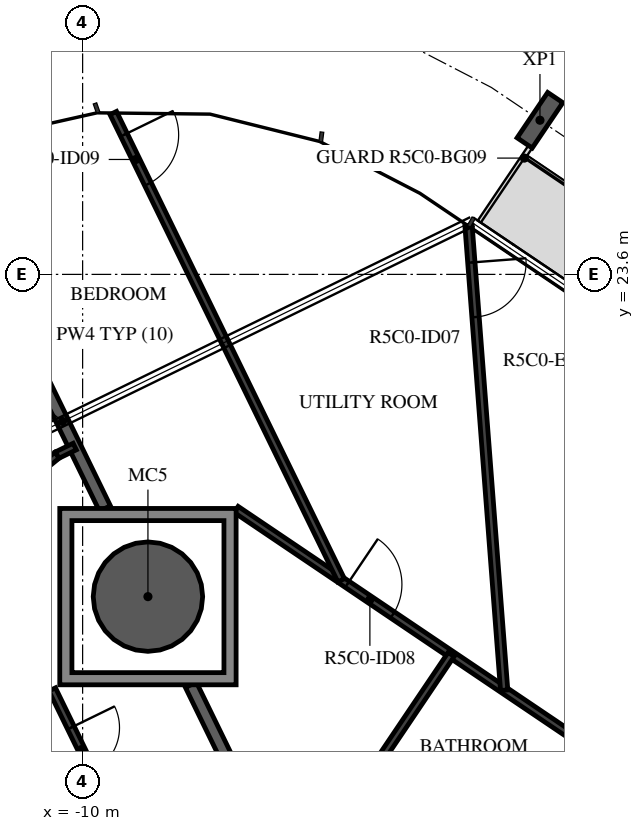
"""IFC4 building model, lengths in metres.
Left out: names, types, materials, properties, quantities, classifications, styles, units other than length and angle.
Written with IfcOpenShell. Run it as: python <this file> out.ifc"""

import sys

from ifc_helpers import new_model, si_unit, direction, frame, frame_2d, origin, origin_2d, place, context, subcontext, project, spatial, polyline, rectangle, hollow_circle, i_section, outline, extrude, element, fill, save


model = new_model("IFC4")
c1 = context("Model", 3, precision=1e-05, world=origin(), true_north=direction((0.0, 1.0)))
c2 = subcontext(c1, "Body", "Model", "MODEL_VIEW")
j1 = project(units=[si_unit("LENGTHUNIT", "METRE"), si_unit("PLANEANGLEUNIT", "RADIAN")], contexts=[c1])
p1 = place(None, origin())
s1 = spatial("IfcSite", under=j1, at=p1, CompositionType="ELEMENT")
p2 = place(p1, origin())
s2 = spatial("IfcBuilding", under=s1, at=p2, CompositionType="ELEMENT")
p3 = place(p2, frame((0.0, 0.0, 216.4)))
s3 = spatial("IfcBuildingStorey", under=s2, at=p3, CompositionType="ELEMENT", Elevation=216.4)
p4 = place(p3, frame((-8.926, 18.301, -0.38), z_axis=(0.0, 0.0, 1.0), x_axis=(1.0, 0.0, 0.0)))
e1 = element("IfcColumn", 1, at=p4, inside=s3, PredefinedType="COLUMN", context=c2, shape_type="SweptSolid", body=[
    extrude(hollow_circle(Radius=0.9, WallThickness=0.04, at=origin_2d()), origin(), (0.0, 0.0, 1.0), 2.616),
])
p5 = place(p3, frame((-2.479, 26.135, -0.38), z_axis=(0.0, 0.0, 1.0), x_axis=(0.829037661466, -0.559192771654, 0.0)))
e2 = element("IfcColumn", 2, at=p5, inside=s3, PredefinedType="COLUMN", context=c2, shape_type="SweptSolid", body=[
    extrude(i_section(OverallWidth=0.3, OverallDepth=0.9, WebThickness=0.019, FlangeThickness=0.035, FilletRadius=0.03, at=origin_2d()), origin(), (0.0, 0.0, 1.0), 2.616),
])
p6 = place(p3, frame((-8.219, 16.851, 0.0), z_axis=(0.0, 0.0, 1.0), x_axis=(0.438291091101, -0.898833087654, 0.0)))
e3 = element("IfcWall", 3, at=p6, inside=s3, PredefinedType="STANDARD", context=c2, shape_type="SweptSolid", body=[
    extrude(rectangle(XDim=3.774, YDim=0.2, at=frame_2d((1.887, 0.0))), origin(), (0.0, 0.0, 1.0), 3.05),
])
p7 = place(p3, frame((-12.409, 25.442, 0.0), z_axis=(0.0, 0.0, 1.0), x_axis=(0.43838641251, -0.898786600549, 0.0)))
e4 = element("IfcWall", 4, at=p7, inside=s3, PredefinedType="STANDARD", context=c2, shape_type="SweptSolid", body=[
    extrude(rectangle(XDim=6.333, YDim=0.2, at=frame_2d((3.166, 0.0))), origin(), (0.0, 0.0, 1.0), 3.05),
])
p8 = place(p3, frame((-7.476, 19.735, 0.0), z_axis=(0.0, 0.0, 1.0), x_axis=(0.829035412992, -0.559196105142, 0.0)))
e5 = element("IfcWall", 5, at=p8, inside=s3, PredefinedType="PARTITIONING", context=c2, shape_type="SweptSolid", body=[
    extrude(rectangle(XDim=8.531, YDim=0.12, at=frame_2d((4.266, 0.0))), origin(), (0.0, 0.0, 1.0), 3.05),
])
p9 = place(p8, frame((2.204, 0.0, 0.0)))
e6 = element("IfcOpeningElement", 6, at=p9, cuts=e5, PredefinedType="OPENING", context=c2, shape_type="SweptSolid", body=[
    extrude(rectangle(XDim=0.9, YDim=2.1, at=frame_2d((0.45, 1.05))), frame((0.0, 0.07, 0.0), z_axis=(0.0, -1.0, 0.0), x_axis=(1.0, 0.0, 0.0)), (0.0, 0.0, 1.0), 0.14),
])
p10 = place(p3, frame((-3.653, 24.394, 0.0), z_axis=(0.0, 0.0, 1.0), x_axis=(0.076513576433, -0.997068539581, 0.0)))
e7 = element("IfcWall", 7, at=p10, inside=s3, PredefinedType="PARTITIONING", context=c2, shape_type="SweptSolid", body=[
    extrude(rectangle(XDim=7.655, YDim=0.12, at=frame_2d((3.827, 0.0))), origin(), (0.0, 0.0, 1.0), 3.05),
])
p11 = place(p10, frame((0.6, 0.0, 0.0)))
e8 = element("IfcOpeningElement", 8, at=p11, cuts=e7, PredefinedType="OPENING", context=c2, shape_type="SweptSolid", body=[
    extrude(rectangle(XDim=0.9, YDim=2.1, at=frame_2d((0.45, 1.05))), frame((0.0, 0.07, 0.0), z_axis=(0.0, -1.0, 0.0), x_axis=(1.0, 0.0, 0.0)), (0.0, 0.0, 1.0), 0.14),
])
p12 = place(p3, frame((-3.939, 17.35, 0.0), z_axis=(0.0, 0.0, 1.0), x_axis=(-0.559193216274, -0.829037361566, 0.0)))
e9 = element("IfcWall", 9, at=p12, inside=s3, PredefinedType="PARTITIONING", context=c2, shape_type="SweptSolid", body=[
    extrude(rectangle(XDim=4.694, YDim=0.12, at=frame_2d((2.347, 0.0))), origin(), (0.0, 0.0, 1.0), 3.05),
])
p13 = place(p3, frame((-9.496, 26.254, 0.0), z_axis=(0.0, 0.0, 1.0), x_axis=(0.438361739807, -0.89879863433, 0.0)))
e10 = element("IfcWall", 10, at=p13, inside=s3, PredefinedType="PARTITIONING", context=c2, shape_type="SweptSolid", body=[
    extrude(rectangle(XDim=8.549, YDim=0.12, at=frame_2d((4.274, 0.0))), origin(), (0.0, 0.0, 1.0), 3.05),
])
p14 = place(p13, frame((0.4, 0.0, 0.0)))
e11 = element("IfcOpeningElement", 11, at=p14, cuts=e10, PredefinedType="OPENING", context=c2, shape_type="SweptSolid", body=[
    extrude(rectangle(XDim=0.9, YDim=2.1, at=frame_2d((0.45, 1.05))), frame((0.0, 0.07, 0.0), z_axis=(0.0, -1.0, 0.0), x_axis=(1.0, 0.0, 0.0)), (0.0, 0.0, 1.0), 0.14),
])
p15 = place(p3, frame((-10.5, 16.775, 0.0), z_axis=(0.0, 0.0, 1.0), x_axis=(0.438345136783, -0.898806731761, 0.0)))
e12 = element("IfcWall", 12, at=p15, inside=s3, PredefinedType="PARTITIONING", context=c2, shape_type="SweptSolid", body=[
    extrude(rectangle(XDim=4.78, YDim=0.12, at=frame_2d((2.39, 0.0))), origin(), (0.0, 0.0, 1.0), 3.05),
])
p16 = place(p15, frame((0.7, 0.0, 0.0)))
e13 = element("IfcOpeningElement", 13, at=p16, cuts=e12, PredefinedType="OPENING", context=c2, shape_type="SweptSolid", body=[
    extrude(rectangle(XDim=0.8, YDim=2.1, at=frame_2d((0.4, 1.05))), frame((0.0, 0.07, 0.0), z_axis=(0.0, -1.0, 0.0), x_axis=(1.0, 0.0, 0.0)), (0.0, 0.0, 1.0), 0.14),
])
p17 = place(p15, frame((2.899, 0.0, 0.0)))
e14 = element("IfcOpeningElement", 14, at=p17, cuts=e12, PredefinedType="OPENING", context=c2, shape_type="SweptSolid", body=[
    extrude(rectangle(XDim=0.9, YDim=2.1, at=frame_2d((0.45, 1.05))), frame((0.0, 0.07, 0.0), z_axis=(0.0, -1.0, 0.0), x_axis=(1.0, 0.0, 0.0)), (0.0, 0.0, 1.0), 0.14),
])
p18 = place(p3, frame((-10.915, 20.221, 0.0), z_axis=(0.0, 0.0, 1.0), x_axis=(0.773278980213, 0.634065941965, 0.0)))
e15 = element("IfcWall", 15, at=p18, inside=s3, PredefinedType="PARTITIONING", context=c2, shape_type="SweptSolid", body=[
    extrude(rectangle(XDim=0.642, YDim=0.12, at=frame_2d((0.321, 0.0))), origin(), (0.0, 0.0, 1.0), 3.05),
])
p19 = place(p3, frame((-10.418, 20.628, 0.0), z_axis=(0.0, 0.0, 1.0), x_axis=(0.898943795765, 0.438063981692, 0.0)))
e16 = element("IfcWall", 16, at=p19, inside=s3, PredefinedType="PARTITIONING", context=c2, shape_type="SweptSolid", body=[
    extrude(rectangle(XDim=0.321, YDim=0.12, at=frame_2d((0.161, 0.0))), origin(), (0.0, 0.0, 1.0), 3.05),
])
p20 = place(p3, origin())
e17 = element("IfcWall", 17, at=p20, inside=s3, PredefinedType="STANDARD", context=c2, shape_type="SweptSolid", body=[
    extrude(outline(polyline([(-7.476, 19.751), (-7.476, 16.851), (-10.376, 16.851), (-10.376, 19.751), (-7.476, 19.751)]), holes=[polyline([(-10.176, 17.051), (-7.676, 17.051), (-7.676, 19.551), (-10.176, 19.551), (-10.176, 17.051)])]), origin(), (0.0, 0.0, 1.0), 3.05),
])
p21 = place(p11, origin())
e18 = element("IfcDoor", 18, at=p21, inside=s3, OperationType="SINGLE_SWING_RIGHT", PredefinedType="DOOR", context=c2, shape_type="SweptSolid", body=[
    extrude(rectangle(XDim=0.9, YDim=2.1, at=frame_2d((0.45, 1.05))), frame((0.0, 0.025, 0.0), z_axis=(0.0, -1.0, 0.0), x_axis=(1.0, 0.0, 0.0)), (0.0, 0.0, 1.0), 0.05),
])
fill(e8, e18)
p22 = place(p9, origin())
e19 = element("IfcDoor", 19, at=p22, inside=s3, OperationType="SINGLE_SWING_LEFT", PredefinedType="DOOR", context=c2, shape_type="SweptSolid", body=[
    extrude(rectangle(XDim=0.9, YDim=2.1, at=frame_2d((0.45, 1.05))), frame((0.0, 0.025, 0.0), z_axis=(0.0, -1.0, 0.0), x_axis=(1.0, 0.0, 0.0)), (0.0, 0.0, 1.0), 0.05),
])
fill(e6, e19)
p23 = place(p14, origin())
e20 = element("IfcDoor", 20, at=p23, inside=s3, OperationType="SINGLE_SWING_RIGHT", PredefinedType="DOOR", context=c2, shape_type="SweptSolid", body=[
    extrude(rectangle(XDim=0.9, YDim=2.1, at=frame_2d((0.45, 1.05))), frame((0.0, 0.025, 0.0), z_axis=(0.0, -1.0, 0.0), x_axis=(1.0, 0.0, 0.0)), (0.0, 0.0, 1.0), 0.05),
])
fill(e11, e20)
p24 = place(p16, origin())
e21 = element("IfcDoor", 21, at=p24, inside=s3, OperationType="SINGLE_SWING_LEFT", PredefinedType="DOOR", context=c2, shape_type="SweptSolid", body=[
    extrude(rectangle(XDim=0.8, YDim=2.1, at=frame_2d((0.4, 1.05))), frame((0.0, 0.025, 0.0), z_axis=(0.0, -1.0, 0.0), x_axis=(1.0, 0.0, 0.0)), (0.0, 0.0, 1.0), 0.05),
])
fill(e13, e21)
save(model, sys.argv[1])
